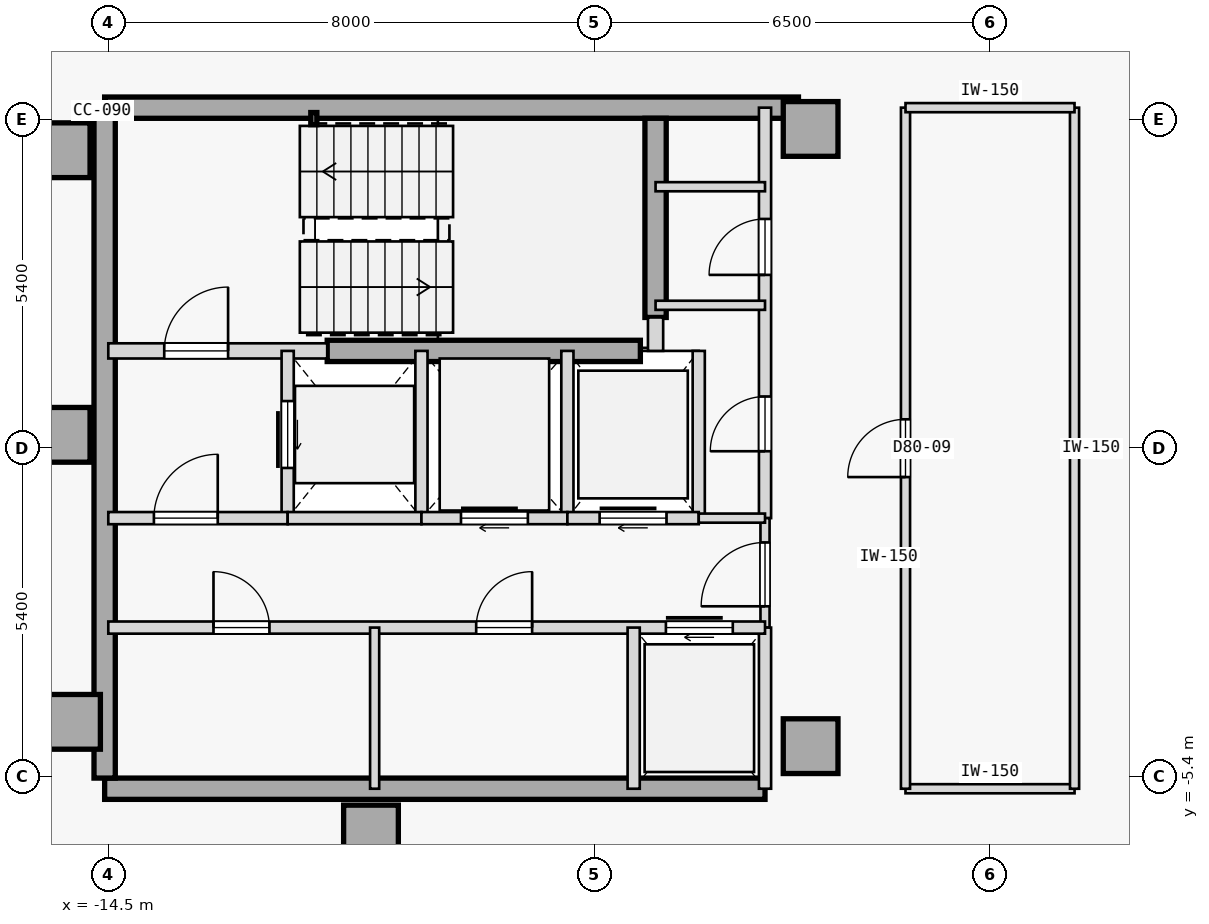
"""IFC4 building model, lengths in metres.
Left out: names, types, materials, properties, quantities, classifications, styles, units other than length and angle.
Written with IfcOpenShell. Run it as: python <this file> out.ifc"""

import sys

from ifc_helpers import new_model, si_unit, direction, frame, frame_2d, origin, origin_2d, place, context, subcontext, project, spatial, rectangle, hollow_rectangle, extrude, element, fill, save


model = new_model("IFC4")
c1 = context("Model", 3, precision=1e-05, world=origin(), true_north=direction((0.0, 1.0)))
c2 = subcontext(c1, "Body", "Model", "MODEL_VIEW")
j1 = project(units=[si_unit("LENGTHUNIT", "METRE"), si_unit("PLANEANGLEUNIT", "RADIAN")], contexts=[c1])
p1 = place(None, origin())
s1 = spatial("IfcSite", under=j1, at=p1, CompositionType="ELEMENT")
p2 = place(p1, origin())
s2 = spatial("IfcBuilding", under=s1, at=p2, CompositionType="ELEMENT")
p3 = place(p2, frame((0.0, 0.0, 298.65)))
s3 = spatial("IfcBuildingStorey", under=s2, at=p3, CompositionType="ELEMENT", Elevation=298.65)
for number, where, z_axis, x_axis in (
    (1, (-15.25, 4.9, 0.0), (0.0, 0.0, 1.0), (1.0, 0.0, 0.0)),
    (2, (-15.25, 0.22, 0.0), (0.0, 0.0, 1.0), (1.0, 0.0, 0.0)),
    (3, (-15.08, -4.5, 0.0), (0.0, 0.0, 1.0), (1.0, 0.0, 0.0)),
    (4, (-10.18, -6.32, 0.0), (0.0, 0.0, 1.0), (1.0, 0.0, 0.0)),
    (5, (-2.95, -4.9, 0.0), (0.0, 0.0, 1.0), (1.0, 0.0, 0.0)),
    (6, (-2.95, 5.25, 0.0), (0.0, 0.0, 1.0), (1.0, 0.0, 0.0)),
):
    element("IfcColumn", number, at=place(p3, frame(where, z_axis=z_axis, x_axis=x_axis)), inside=s3, PredefinedType="COLUMN", context=c2, shape_type="SweptSolid", body=[
        extrude(rectangle(XDim=0.9, YDim=0.9, at=origin_2d()), origin(), (0.0, 0.0, 1.0), 3.35),
    ])
p4 = place(p3, frame((-14.56, 5.6, 0.0), z_axis=(0.0, 0.0, 1.0), x_axis=(1.0, 0.0, 0.0)))
e7 = element("IfcWall", 7, at=p4, inside=s3, PredefinedType="SHEAR", context=c2, shape_type="SweptSolid", body=[
    extrude(rectangle(XDim=11.41, YDim=0.35, at=frame_2d((5.705, 0.0))), origin(), (0.0, 0.0, 1.0), 3.125),
])
p5 = place(p3, frame((-14.56, -5.6, 0.0), z_axis=(0.0, 0.0, 1.0), x_axis=(1.0, 0.0, 0.0)))
e8 = element("IfcWall", 8, at=p5, inside=s3, PredefinedType="SHEAR", context=c2, shape_type="SweptSolid", body=[
    extrude(rectangle(XDim=10.86, YDim=0.35, at=frame_2d((5.43, 0.0))), origin(), (0.0, 0.0, 1.0), 3.125),
])
p6 = place(p3, frame((-14.56, -5.425, 0.0), z_axis=(0.0, 0.0, 1.0), x_axis=(0.0, 1.0, 0.0)))
e9 = element("IfcWall", 9, at=p6, inside=s3, PredefinedType="SHEAR", context=c2, shape_type="SweptSolid", body=[
    extrude(rectangle(XDim=10.85, YDim=0.35, at=frame_2d((5.425, 0.0))), origin(), (0.0, 0.0, 1.0), 3.125),
])
p7 = place(p3, frame((-5.5, 2.15, 0.0), z_axis=(0.0, 0.0, 1.0), x_axis=(0.0, 1.0, 0.0)))
e10 = element("IfcWall", 10, at=p7, inside=s3, PredefinedType="SHEAR", context=c2, shape_type="SweptSolid", body=[
    extrude(rectangle(XDim=3.275, YDim=0.35, at=frame_2d((1.638, 0.0))), origin(), (0.0, 0.0, 1.0), 3.125),
])
p8 = place(p3, frame((-10.9, 1.6, 0.0), z_axis=(0.0, 0.0, 1.0), x_axis=(1.0, 0.0, 0.0)))
e11 = element("IfcWall", 11, at=p8, inside=s3, PredefinedType="SHEAR", context=c2, shape_type="SweptSolid", body=[
    extrude(rectangle(XDim=5.15, YDim=0.35, at=frame_2d((2.575, 0.0))), origin(), (0.0, 0.0, 1.0), 3.125),
])
p9 = place(p3, frame((-11.12, 5.42, 0.0), z_axis=(0.0, 0.0, 1.0), x_axis=(1.0, 0.0, 0.0)))
e12 = element("IfcColumn", 12, at=p9, inside=s3, PredefinedType="COLUMN", context=c2, shape_type="SweptSolid", body=[
    extrude(hollow_rectangle(XDim=0.1, YDim=0.2, WallThickness=0.008, at=origin_2d()), origin(), (0.0, 0.0, 1.0), 3.35),
])
p10 = place(p3, frame((-14.5, 1.6, 0.0), z_axis=(0.0, 0.0, 1.0), x_axis=(1.0, 0.0, 0.0)))
e13 = element("IfcWall", 13, at=p10, inside=s3, PredefinedType="STANDARD", context=c2, shape_type="SweptSolid", body=[
    extrude(rectangle(XDim=3.6, YDim=0.25, at=frame_2d((1.8, 0.0))), origin(), (0.0, 0.0, 1.0), 3.125),
])
p11 = place(p10, frame((0.92, 0.0, 0.0)))
e14 = element("IfcOpeningElement", 14, at=p11, cuts=e13, PredefinedType="OPENING", context=c2, shape_type="SweptSolid", body=[
    extrude(rectangle(XDim=1.05, YDim=2.15, at=frame_2d((0.525, 1.075))), frame((0.0, 0.135, 0.0), z_axis=(0.0, -1.0, 0.0), x_axis=(1.0, 0.0, 0.0)), (0.0, 0.0, 1.0), 0.27),
])
p12 = place(p3, frame((-5.5, 1.6, 0.0), z_axis=(0.0, 0.0, 1.0), x_axis=(0.0, 1.0, 0.0)))
e15 = element("IfcWall", 15, at=p12, inside=s3, PredefinedType="STANDARD", context=c2, shape_type="SweptSolid", body=[
    extrude(rectangle(XDim=0.55, YDim=0.25, at=frame_2d((0.275, 0.0))), origin(), (0.0, 0.0, 1.0), 3.125),
])
p13 = place(p3, frame((-3.7, -1.15, 0.0), z_axis=(0.0, 0.0, 1.0), x_axis=(0.0, 1.0, 0.0)))
e16 = element("IfcWall", 16, at=p13, inside=s3, PredefinedType="STANDARD", context=c2, shape_type="SweptSolid", body=[
    extrude(rectangle(XDim=6.75, YDim=0.2, at=frame_2d((3.375, 0.0))), origin(), (0.0, 0.0, 1.0), 3.125),
])
p14 = place(p13, frame((1.1, 0.0, 0.0)))
e17 = element("IfcOpeningElement", 17, at=p14, cuts=e16, PredefinedType="OPENING", context=c2, shape_type="SweptSolid", body=[
    extrude(rectangle(XDim=0.9, YDim=2.15, at=frame_2d((0.45, 1.075))), frame((0.0, 0.11, 0.0), z_axis=(0.0, -1.0, 0.0), x_axis=(1.0, 0.0, 0.0)), (0.0, 0.0, 1.0), 0.22),
])
p15 = place(p13, frame((4.0, 0.0, 0.0)))
e18 = element("IfcOpeningElement", 18, at=p15, cuts=e16, PredefinedType="OPENING", context=c2, shape_type="SweptSolid", body=[
    extrude(rectangle(XDim=0.92, YDim=2.15, at=frame_2d((0.46, 1.075))), frame((0.0, 0.11, 0.0), z_axis=(0.0, -1.0, 0.0), x_axis=(1.0, 0.0, 0.0)), (0.0, 0.0, 1.0), 0.22),
])
p16 = place(p3, frame((-3.7, -2.95, 0.0), z_axis=(0.0, 0.0, 1.0), x_axis=(0.0, 1.0, 0.0)))
e19 = element("IfcWall", 19, at=p16, inside=s3, PredefinedType="PARTITIONING", context=c2, shape_type="SweptSolid", body=[
    extrude(rectangle(XDim=1.8, YDim=0.15, at=frame_2d((0.9, 0.0))), origin(), (0.0, 0.0, 1.0), 3.125),
])
p17 = place(p16, frame((0.35, 0.0, 0.0)))
e20 = element("IfcOpeningElement", 20, at=p17, cuts=e19, PredefinedType="OPENING", context=c2, shape_type="SweptSolid", body=[
    extrude(rectangle(XDim=1.05, YDim=2.18, at=frame_2d((0.525, 1.09))), frame((0.0, 0.085, 0.0), z_axis=(0.0, -1.0, 0.0), x_axis=(1.0, 0.0, 0.0)), (0.0, 0.0, 1.0), 0.17),
])
p18 = place(p3, frame((-3.7, -5.6, 0.0), z_axis=(0.0, 0.0, 1.0), x_axis=(0.0, 1.0, 0.0)))
e21 = element("IfcWall", 21, at=p18, inside=s3, PredefinedType="STANDARD", context=c2, shape_type="SweptSolid", body=[
    extrude(rectangle(XDim=2.65, YDim=0.2, at=frame_2d((1.325, 0.0))), origin(), (0.0, 0.0, 1.0), 3.125),
])
p19 = place(p3, frame((-11.55, -1.15, 0.0), z_axis=(0.0, 0.0, 1.0), x_axis=(0.0, 1.0, 0.0)))
e22 = element("IfcWall", 22, at=p19, inside=s3, PredefinedType="STANDARD", context=c2, shape_type="SweptSolid", body=[
    extrude(rectangle(XDim=2.75, YDim=0.2, at=frame_2d((1.375, 0.0))), origin(), (0.0, 0.0, 1.0), 3.125),
])
p20 = place(p19, frame((0.825, 0.0, 0.0)))
e23 = element("IfcOpeningElement", 23, at=p20, cuts=e22, PredefinedType="OPENING", context=c2, shape_type="SweptSolid", body=[
    extrude(rectangle(XDim=1.1, YDim=2.15, at=frame_2d((0.55, 1.075))), frame((0.0, 0.11, 0.0), z_axis=(0.0, -1.0, 0.0), x_axis=(1.0, 0.0, 0.0)), (0.0, 0.0, 1.0), 0.22),
])
p21 = place(p3, frame((-9.35, -1.15, 0.0), z_axis=(0.0, 0.0, 1.0), x_axis=(0.0, 1.0, 0.0)))
e24 = element("IfcWall", 24, at=p21, inside=s3, PredefinedType="STANDARD", context=c2, shape_type="SweptSolid", body=[
    extrude(rectangle(XDim=2.75, YDim=0.2, at=frame_2d((1.375, 0.0))), origin(), (0.0, 0.0, 1.0), 3.125),
])
p22 = place(p3, frame((-14.5, -1.15, 0.0), z_axis=(0.0, 0.0, 1.0), x_axis=(1.0, 0.0, 0.0)))
e25 = element("IfcWall", 25, at=p22, inside=s3, PredefinedType="STANDARD", context=c2, shape_type="SweptSolid", body=[
    extrude(rectangle(XDim=2.95, YDim=0.2, at=frame_2d((1.475, 0.0))), origin(), (0.0, 0.0, 1.0), 3.125),
])
p23 = place(p22, frame((0.75, 0.0, 0.0)))
e26 = element("IfcOpeningElement", 26, at=p23, cuts=e25, PredefinedType="OPENING", context=c2, shape_type="SweptSolid", body=[
    extrude(rectangle(XDim=1.05, YDim=2.18, at=frame_2d((0.525, 1.09))), frame((0.0, 0.11, 0.0), z_axis=(0.0, -1.0, 0.0), x_axis=(1.0, 0.0, 0.0)), (0.0, 0.0, 1.0), 0.22),
])
p24 = place(p3, frame((-11.55, -1.15, 0.0), z_axis=(0.0, 0.0, 1.0), x_axis=(1.0, 0.0, 0.0)))
e27 = element("IfcWall", 27, at=p24, inside=s3, PredefinedType="STANDARD", context=c2, shape_type="SweptSolid", body=[
    extrude(rectangle(XDim=2.2, YDim=0.2, at=frame_2d((1.1, 0.0))), origin(), (0.0, 0.0, 1.0), 3.125),
])
p25 = place(p3, frame((-6.95, -1.15, 0.0), z_axis=(0.0, 0.0, 1.0), x_axis=(0.0, 1.0, 0.0)))
e28 = element("IfcWall", 28, at=p25, inside=s3, PredefinedType="STANDARD", context=c2, shape_type="SweptSolid", body=[
    extrude(rectangle(XDim=2.75, YDim=0.2, at=frame_2d((1.375, 0.0))), origin(), (0.0, 0.0, 1.0), 3.125),
])
p26 = place(p3, frame((-9.35, -1.15, 0.0), z_axis=(0.0, 0.0, 1.0), x_axis=(1.0, 0.0, 0.0)))
e29 = element("IfcWall", 29, at=p26, inside=s3, PredefinedType="STANDARD", context=c2, shape_type="SweptSolid", body=[
    extrude(rectangle(XDim=2.4, YDim=0.2, at=frame_2d((1.2, 0.0))), origin(), (0.0, 0.0, 1.0), 3.125),
])
p27 = place(p26, frame((0.65, 0.0, 0.0)))
e30 = element("IfcOpeningElement", 30, at=p27, cuts=e29, PredefinedType="OPENING", context=c2, shape_type="SweptSolid", body=[
    extrude(rectangle(XDim=1.1, YDim=2.15, at=frame_2d((0.55, 1.075))), frame((0.0, 0.11, 0.0), z_axis=(0.0, -1.0, 0.0), x_axis=(1.0, 0.0, 0.0)), (0.0, 0.0, 1.0), 0.22),
])
p28 = place(p3, frame((-4.79, -1.15, 0.0), z_axis=(0.0, 0.0, 1.0), x_axis=(0.0, 1.0, 0.0)))
e31 = element("IfcWall", 31, at=p28, inside=s3, PredefinedType="STANDARD", context=c2, shape_type="SweptSolid", body=[
    extrude(rectangle(XDim=2.75, YDim=0.2, at=frame_2d((1.375, 0.0))), origin(), (0.0, 0.0, 1.0), 3.125),
])
p29 = place(p3, frame((-6.95, -1.15, 0.0), z_axis=(0.0, 0.0, 1.0), x_axis=(1.0, 0.0, 0.0)))
e32 = element("IfcWall", 32, at=p29, inside=s3, PredefinedType="STANDARD", context=c2, shape_type="SweptSolid", body=[
    extrude(rectangle(XDim=2.16, YDim=0.2, at=frame_2d((1.08, 0.0))), origin(), (0.0, 0.0, 1.0), 3.125),
])
p30 = place(p29, frame((0.53, 0.0, 0.0)))
e33 = element("IfcOpeningElement", 33, at=p30, cuts=e32, PredefinedType="OPENING", context=c2, shape_type="SweptSolid", body=[
    extrude(rectangle(XDim=1.1, YDim=2.15, at=frame_2d((0.55, 1.075))), frame((0.0, 0.11, 0.0), z_axis=(0.0, -1.0, 0.0), x_axis=(1.0, 0.0, 0.0)), (0.0, 0.0, 1.0), 0.22),
])
p31 = place(p3, frame((-4.79, -1.15, 0.0), z_axis=(0.0, 0.0, 1.0), x_axis=(1.0, 0.0, 0.0)))
e34 = element("IfcWall", 34, at=p31, inside=s3, PredefinedType="PARTITIONING", context=c2, shape_type="SweptSolid", body=[
    extrude(rectangle(XDim=1.09, YDim=0.15, at=frame_2d((0.545, 0.0))), origin(), (0.0, 0.0, 1.0), 3.125),
])
p32 = place(p3, frame((-14.5, -2.95, 0.0), z_axis=(0.0, 0.0, 1.0), x_axis=(1.0, 0.0, 0.0)))
e35 = element("IfcWall", 35, at=p32, inside=s3, PredefinedType="STANDARD", context=c2, shape_type="SweptSolid", body=[
    extrude(rectangle(XDim=10.8, YDim=0.2, at=frame_2d((5.4, 0.0))), origin(), (0.0, 0.0, 1.0), 3.125),
])
p33 = place(p32, frame((9.17, 0.0, 0.0)))
e36 = element("IfcOpeningElement", 36, at=p33, cuts=e35, PredefinedType="OPENING", context=c2, shape_type="SweptSolid", body=[
    extrude(rectangle(XDim=1.1, YDim=2.15, at=frame_2d((0.55, 1.075))), frame((0.0, 0.11, 0.0), z_axis=(0.0, -1.0, 0.0), x_axis=(1.0, 0.0, 0.0)), (0.0, 0.0, 1.0), 0.22),
])
p34 = place(p32, frame((1.73, 0.0, 0.0)))
e37 = element("IfcOpeningElement", 37, at=p34, cuts=e35, PredefinedType="OPENING", context=c2, shape_type="SweptSolid", body=[
    extrude(rectangle(XDim=0.92, YDim=2.15, at=frame_2d((0.46, 1.075))), frame((0.0, 0.11, 0.0), z_axis=(0.0, -1.0, 0.0), x_axis=(1.0, 0.0, 0.0)), (0.0, 0.0, 1.0), 0.22),
])
p35 = place(p32, frame((6.05, 0.0, 0.0)))
e38 = element("IfcOpeningElement", 38, at=p35, cuts=e35, PredefinedType="OPENING", context=c2, shape_type="SweptSolid", body=[
    extrude(rectangle(XDim=0.92, YDim=2.15, at=frame_2d((0.46, 1.075))), frame((0.0, 0.11, 0.0), z_axis=(0.0, -1.0, 0.0), x_axis=(1.0, 0.0, 0.0)), (0.0, 0.0, 1.0), 0.22),
])
p36 = place(p3, frame((-5.86, -5.6, 0.0), z_axis=(0.0, 0.0, 1.0), x_axis=(0.0, 1.0, 0.0)))
e39 = element("IfcWall", 39, at=p36, inside=s3, PredefinedType="STANDARD", context=c2, shape_type="SweptSolid", body=[
    extrude(rectangle(XDim=2.65, YDim=0.2, at=frame_2d((1.325, 0.0))), origin(), (0.0, 0.0, 1.0), 3.125),
])
p37 = place(p3, frame((-10.12, -5.6, 0.0), z_axis=(0.0, 0.0, 1.0), x_axis=(0.0, 1.0, 0.0)))
e40 = element("IfcWall", 40, at=p37, inside=s3, PredefinedType="PARTITIONING", context=c2, shape_type="SweptSolid", body=[
    extrude(rectangle(XDim=2.65, YDim=0.15, at=frame_2d((1.325, 0.0))), origin(), (0.0, 0.0, 1.0), 3.125),
])
for number, where, z_axis, x_axis in (
    (41, (-5.5, 4.3, 0.0), (0.0, 0.0, 1.0), (1.0, 0.0, 0.0)),
    (42, (-5.5, 2.35, 0.0), (0.0, 0.0, 1.0), (1.0, 0.0, 0.0)),
):
    element("IfcWall", number, at=place(p3, frame(where, z_axis=z_axis, x_axis=x_axis)), inside=s3, PredefinedType="PARTITIONING", context=c2, shape_type="SweptSolid", body=[
        extrude(rectangle(XDim=1.8, YDim=0.15, at=frame_2d((0.9, 0.0))), origin(), (0.0, 0.0, 1.0), 3.125),
    ])
p38 = place(p3, frame((-1.39, -5.6, 0.0), z_axis=(0.0, 0.0, 1.0), x_axis=(0.999999996145, -8.7811731e-05, 0.0)))
e43 = element("IfcWall", 43, at=p38, inside=s3, PredefinedType="PARTITIONING", context=c2, shape_type="SweptSolid", body=[
    extrude(rectangle(XDim=2.78, YDim=0.15, at=frame_2d((1.39, 0.0))), origin(), (0.0, 0.0, 1.0), 3.125),
])
p39 = place(p3, frame((-1.39, -5.6, 0.0), z_axis=(0.0, 0.0, 1.0), x_axis=(2.1797415e-05, 0.999999999762, 0.0)))
e44 = element("IfcWall", 44, at=p39, inside=s3, PredefinedType="PARTITIONING", context=c2, shape_type="SweptSolid", body=[
    extrude(rectangle(XDim=11.2, YDim=0.15, at=frame_2d((5.6, 0.0))), origin(), (0.0, 0.0, 1.0), 3.125),
])
p40 = place(p39, frame((5.125, 0.0, 0.0)))
e45 = element("IfcOpeningElement", 45, at=p40, cuts=e44, PredefinedType="OPENING", context=c2, shape_type="SweptSolid", body=[
    extrude(rectangle(XDim=0.95, YDim=2.15, at=frame_2d((0.475, 1.075))), frame((0.0, 0.085, 0.0), z_axis=(0.0, -1.0, 0.0), x_axis=(1.0, 0.0, 0.0)), (0.0, 0.0, 1.0), 0.17),
])
p41 = place(p3, frame((1.39, -5.6, 0.0), z_axis=(0.0, 0.0, 1.0), x_axis=(-4.359578e-05, 0.99999999905, 0.0)))
e46 = element("IfcWall", 46, at=p41, inside=s3, PredefinedType="PARTITIONING", context=c2, shape_type="SweptSolid", body=[
    extrude(rectangle(XDim=11.2, YDim=0.15, at=frame_2d((5.6, 0.0))), origin(), (0.0, 0.0, 1.0), 3.125),
])
p42 = place(p3, frame((-1.39, 5.6, 0.0), z_axis=(0.0, 0.0, 1.0), x_axis=(0.99999998457, -0.000175669738, 0.0)))
e47 = element("IfcWall", 47, at=p42, inside=s3, PredefinedType="PARTITIONING", context=c2, shape_type="SweptSolid", body=[
    extrude(rectangle(XDim=2.78, YDim=0.15, at=frame_2d((1.39, 0.0))), origin(), (0.0, 0.0, 1.0), 3.125),
])
p43 = place(p3, frame((-16.716, 6.387, 0.0), z_axis=(0.0, 0.0, 1.0), x_axis=(0.913548379071, 0.406730081378, 0.0)))
e48 = element("IfcWall", 48, at=p43, inside=s3, PredefinedType="PARTITIONING", context=c2, shape_type="SweptSolid", body=[
    extrude(rectangle(XDim=5.015, YDim=0.15, at=frame_2d((2.508, 0.0))), origin(), (0.0, 0.0, 1.0), 3.125),
])
p44 = place(p43, frame((2.032, 0.0, 0.0)))
e49 = element("IfcOpeningElement", 49, at=p44, cuts=e48, PredefinedType="OPENING", context=c2, shape_type="SweptSolid", body=[
    extrude(rectangle(XDim=0.95, YDim=2.15, at=frame_2d((0.475, 1.075))), frame((0.0, 0.085, 0.0), z_axis=(0.0, -1.0, 0.0), x_axis=(1.0, 0.0, 0.0)), (0.0, 0.0, 1.0), 0.17),
])
p45 = place(p3, frame((-14.87, -9.159, 0.0), z_axis=(0.0, 0.0, 1.0), x_axis=(-0.40674435803, 0.913542022685, 0.0)))
e50 = element("IfcWall", 50, at=p45, inside=s3, PredefinedType="PARTITIONING", context=c2, shape_type="SweptSolid", body=[
    extrude(rectangle(XDim=5.383, YDim=0.15, at=frame_2d((2.691, 0.0))), origin(), (0.0, 0.0, 1.0), 3.125),
])
p46 = place(p11, origin())
e51 = element("IfcDoor", 51, at=p46, inside=s3, OperationType="SINGLE_SWING_RIGHT", PredefinedType="DOOR", context=c2, shape_type="SweptSolid", body=[
    extrude(rectangle(XDim=1.05, YDim=2.15, at=frame_2d((0.525, 1.075))), frame((0.0, 0.025, 0.0), z_axis=(0.0, -1.0, 0.0), x_axis=(1.0, 0.0, 0.0)), (0.0, 0.0, 1.0), 0.05),
])
fill(e14, e51)
p47 = place(p23, origin())
e52 = element("IfcDoor", 52, at=p47, inside=s3, OperationType="SINGLE_SWING_RIGHT", PredefinedType="DOOR", context=c2, shape_type="SweptSolid", body=[
    extrude(rectangle(XDim=1.05, YDim=2.18, at=frame_2d((0.525, 1.09))), frame((0.0, 0.025, 0.0), z_axis=(0.0, -1.0, 0.0), x_axis=(1.0, 0.0, 0.0)), (0.0, 0.0, 1.0), 0.05),
])
fill(e26, e52)
p48 = place(p17, origin())
e53 = element("IfcDoor", 53, at=p48, inside=s3, OperationType="SINGLE_SWING_LEFT", PredefinedType="DOOR", context=c2, shape_type="SweptSolid", body=[
    extrude(rectangle(XDim=1.05, YDim=2.18, at=frame_2d((0.525, 1.09))), frame((0.0, 0.025, 0.0), z_axis=(0.0, -1.0, 0.0), x_axis=(1.0, 0.0, 0.0)), (0.0, 0.0, 1.0), 0.05),
])
fill(e20, e53)
p49 = place(p20, origin())
e54 = element("IfcDoor", 54, at=p49, inside=s3, OperationType="SLIDING_TO_RIGHT", PredefinedType="DOOR", context=c2, shape_type="SweptSolid", body=[
    extrude(rectangle(XDim=1.1, YDim=2.15, at=frame_2d((0.55, 1.075))), frame((0.0, 0.025, 0.0), z_axis=(0.0, -1.0, 0.0), x_axis=(1.0, 0.0, 0.0)), (0.0, 0.0, 1.0), 0.05),
])
fill(e23, e54)
p50 = place(p27, origin())
e55 = element("IfcDoor", 55, at=p50, inside=s3, OperationType="SLIDING_TO_RIGHT", PredefinedType="DOOR", context=c2, shape_type="SweptSolid", body=[
    extrude(rectangle(XDim=1.1, YDim=2.15, at=frame_2d((0.55, 1.075))), frame((0.0, 0.025, 0.0), z_axis=(0.0, -1.0, 0.0), x_axis=(1.0, 0.0, 0.0)), (0.0, 0.0, 1.0), 0.05),
])
fill(e30, e55)
p51 = place(p30, origin())
e56 = element("IfcDoor", 56, at=p51, inside=s3, OperationType="SLIDING_TO_RIGHT", PredefinedType="DOOR", context=c2, shape_type="SweptSolid", body=[
    extrude(rectangle(XDim=1.1, YDim=2.15, at=frame_2d((0.55, 1.075))), frame((0.0, 0.025, 0.0), z_axis=(0.0, -1.0, 0.0), x_axis=(1.0, 0.0, 0.0)), (0.0, 0.0, 1.0), 0.05),
])
fill(e33, e56)
p52 = place(p33, origin())
e57 = element("IfcDoor", 57, at=p52, inside=s3, OperationType="SLIDING_TO_RIGHT", PredefinedType="DOOR", context=c2, shape_type="SweptSolid", body=[
    extrude(rectangle(XDim=1.1, YDim=2.15, at=frame_2d((0.55, 1.075))), frame((0.0, 0.025, 0.0), z_axis=(0.0, -1.0, 0.0), x_axis=(1.0, 0.0, 0.0)), (0.0, 0.0, 1.0), 0.05),
])
fill(e36, e57)
p53 = place(p34, origin())
e58 = element("IfcDoor", 58, at=p53, inside=s3, OperationType="SINGLE_SWING_LEFT", PredefinedType="DOOR", context=c2, shape_type="SweptSolid", body=[
    extrude(rectangle(XDim=0.92, YDim=2.15, at=frame_2d((0.46, 1.075))), frame((0.0, 0.025, 0.0), z_axis=(0.0, -1.0, 0.0), x_axis=(1.0, 0.0, 0.0)), (0.0, 0.0, 1.0), 0.05),
])
fill(e37, e58)
p54 = place(p35, origin())
e59 = element("IfcDoor", 59, at=p54, inside=s3, OperationType="SINGLE_SWING_RIGHT", PredefinedType="DOOR", context=c2, shape_type="SweptSolid", body=[
    extrude(rectangle(XDim=0.92, YDim=2.15, at=frame_2d((0.46, 1.075))), frame((0.0, 0.025, 0.0), z_axis=(0.0, -1.0, 0.0), x_axis=(1.0, 0.0, 0.0)), (0.0, 0.0, 1.0), 0.05),
])
fill(e38, e59)
p55 = place(p14, origin())
e60 = element("IfcDoor", 60, at=p55, inside=s3, OperationType="SINGLE_SWING_LEFT", PredefinedType="DOOR", context=c2, shape_type="SweptSolid", body=[
    extrude(rectangle(XDim=0.9, YDim=2.15, at=frame_2d((0.45, 1.075))), frame((0.0, 0.025, 0.0), z_axis=(0.0, -1.0, 0.0), x_axis=(1.0, 0.0, 0.0)), (0.0, 0.0, 1.0), 0.05),
])
fill(e17, e60)
p56 = place(p15, origin())
e61 = element("IfcDoor", 61, at=p56, inside=s3, OperationType="SINGLE_SWING_LEFT", PredefinedType="DOOR", context=c2, shape_type="SweptSolid", body=[
    extrude(rectangle(XDim=0.92, YDim=2.15, at=frame_2d((0.46, 1.075))), frame((0.0, 0.025, 0.0), z_axis=(0.0, -1.0, 0.0), x_axis=(1.0, 0.0, 0.0)), (0.0, 0.0, 1.0), 0.05),
])
fill(e18, e61)
p57 = place(p40, origin())
e62 = element("IfcDoor", 62, at=p57, inside=s3, OperationType="SINGLE_SWING_LEFT", PredefinedType="DOOR", context=c2, shape_type="SweptSolid", body=[
    extrude(rectangle(XDim=0.95, YDim=2.15, at=frame_2d((0.475, 1.075))), frame((0.0, 0.025, 0.0), z_axis=(0.0, -1.0, 0.0), x_axis=(1.0, 0.0, 0.0)), (0.0, 0.0, 1.0), 0.05),
])
fill(e45, e62)
save(model, sys.argv[1])
